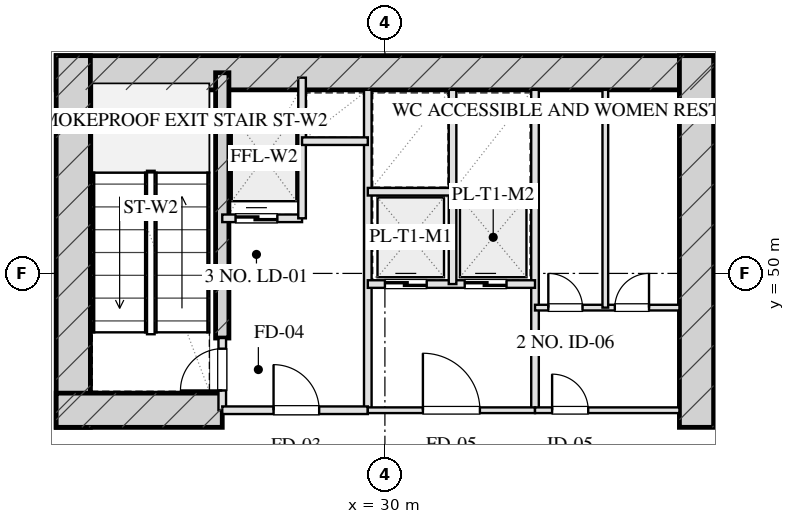
"""IFC4 building model, lengths in metres.
Left out: names, types, materials, properties, quantities, classifications, styles, units other than length and angle.
Written with IfcOpenShell. Run it as: python <this file> out.ifc"""

import sys

from ifc_helpers import new_model, si_unit, direction, frame, frame_2d, origin, place, context, subcontext, project, spatial, rectangle, extrude, element, fill, save


model = new_model("IFC4")
c1 = context("Model", 3, precision=1e-05, world=origin(), true_north=direction((0.0, 1.0)))
c2 = subcontext(c1, "Body", "Model", "MODEL_VIEW")
j1 = project(units=[si_unit("LENGTHUNIT", "METRE"), si_unit("PLANEANGLEUNIT", "RADIAN")], contexts=[c1])
p1 = place(None, origin())
s1 = spatial("IfcSite", under=j1, at=p1, CompositionType="ELEMENT")
p2 = place(p1, origin())
s2 = spatial("IfcBuilding", under=s1, at=p2, CompositionType="ELEMENT")
p3 = place(p2, frame((0.0, 0.0, 11.5)))
s3 = spatial("IfcBuildingStorey", under=s2, at=p3, CompositionType="ELEMENT", Elevation=11.5)
p4 = place(p3, frame((21.35, 55.28, 0.0), z_axis=(0.0, 0.0, 1.0), x_axis=(1.0, 0.0, 0.0)))
e1 = element("IfcWall", 1, at=p4, inside=s3, PredefinedType="SHEAR", context=c2, shape_type="SweptSolid", body=[
    extrude(rectangle(XDim=17.3, YDim=0.9, at=frame_2d((8.65, 0.0))), origin(), (0.0, 0.0, 1.0), 5.0),
])
for number, where, z_axis, x_axis in (
    (2, (21.8, 45.95, 0.0), (0.0, 0.0, 1.0), (0.0, 1.0, 0.0)),
    (3, (38.2, 45.95, 0.0), (0.0, 0.0, 1.0), (0.0, 1.0, 0.0)),
):
    element("IfcWall", number, at=place(p3, frame(where, z_axis=z_axis, x_axis=x_axis)), inside=s3, PredefinedType="SHEAR", context=c2, shape_type="SweptSolid", body=[
        extrude(rectangle(XDim=9.78, YDim=0.9, at=frame_2d((4.89, 0.0))), origin(), (0.0, 0.0, 1.0), 5.0),
    ])
p5 = place(p3, frame((25.72, 48.3, 0.0), z_axis=(0.0, 0.0, 1.0), x_axis=(0.0, 1.0, 0.0)))
e4 = element("IfcWall", 4, at=p5, inside=s3, PredefinedType="SHEAR", context=c2, shape_type="SweptSolid", body=[
    extrude(rectangle(XDim=6.98, YDim=0.35, at=frame_2d((3.49, 0.0))), origin(), (0.0, 0.0, 1.0), 5.0),
])
p6 = place(p3, frame((21.35, 46.4, 0.0), z_axis=(0.0, 0.0, 1.0), x_axis=(1.0, 0.0, 0.0)))
e5 = element("IfcWall", 5, at=p6, inside=s3, PredefinedType="SHEAR", context=c2, shape_type="SweptSolid", body=[
    extrude(rectangle(XDim=4.37, YDim=0.9, at=frame_2d((2.185, 0.0))), origin(), (0.0, 0.0, 1.0), 5.0),
])
p7 = place(p3, frame((25.72, 46.4, 0.0), z_axis=(0.0, 0.0, 1.0), x_axis=(0.0, 1.0, 0.0)))
e6 = element("IfcWall", 6, at=p7, inside=s3, PredefinedType="PARTITIONING", context=c2, shape_type="SweptSolid", body=[
    extrude(rectangle(XDim=1.9, YDim=0.2, at=frame_2d((0.95, 0.0))), origin(), (0.0, 0.0, 1.0), 4.685),
])
p8 = place(p7, frame((0.52, 0.0, 0.0)))
e7 = element("IfcOpeningElement", 7, at=p8, cuts=e6, PredefinedType="OPENING", context=c2, shape_type="SweptSolid", body=[
    extrude(rectangle(XDim=1.1, YDim=2.05, at=frame_2d((0.55, 1.025))), frame((0.0, 0.11, 0.0), z_axis=(0.0, -1.0, 0.0), x_axis=(1.0, 0.0, 0.0)), (0.0, 0.0, 1.0), 0.22),
])
p9 = place(p3, frame((29.55, 46.4, 0.0), z_axis=(0.0, 0.0, 1.0), x_axis=(0.0, 1.0, 0.0)))
e8 = element("IfcWall", 8, at=p9, inside=s3, PredefinedType="PARTITIONING", context=c2, shape_type="SweptSolid", body=[
    extrude(rectangle(XDim=8.43, YDim=0.2, at=frame_2d((4.215, 0.0))), origin(), (0.0, 0.0, 1.0), 4.685),
])
p10 = place(p3, frame((25.72, 46.4, 0.0), z_axis=(0.0, 0.0, 1.0), x_axis=(1.0, 0.0, 0.0)))
e9 = element("IfcWall", 9, at=p10, inside=s3, PredefinedType="PARTITIONING", context=c2, shape_type="SweptSolid", body=[
    extrude(rectangle(XDim=3.83, YDim=0.2, at=frame_2d((1.915, 0.0))), origin(), (0.0, 0.0, 1.0), 4.685),
])
p11 = place(p10, frame((1.35, 0.0, 0.0)))
e10 = element("IfcOpeningElement", 10, at=p11, cuts=e9, PredefinedType="OPENING", context=c2, shape_type="SweptSolid", body=[
    extrude(rectangle(XDim=1.2, YDim=2.05, at=frame_2d((0.6, 1.025))), frame((0.0, 0.11, 0.0), z_axis=(0.0, -1.0, 0.0), x_axis=(1.0, 0.0, 0.0)), (0.0, 0.0, 1.0), 0.22),
])
p12 = place(p3, frame((25.72, 51.45, 0.0), z_axis=(0.0, 0.0, 1.0), x_axis=(1.0, 0.0, 0.0)))
e11 = element("IfcWall", 11, at=p12, inside=s3, PredefinedType="PARTITIONING", context=c2, shape_type="SweptSolid", body=[
    extrude(rectangle(XDim=2.1, YDim=0.2, at=frame_2d((1.05, 0.0))), origin(), (0.0, 0.0, 1.0), 4.685),
])
p13 = place(p12, frame((0.35, 0.0, 0.0)))
e12 = element("IfcOpeningElement", 12, at=p13, cuts=e11, PredefinedType="OPENING", context=c2, shape_type="SweptSolid", body=[
    extrude(rectangle(XDim=1.1, YDim=2.05, at=frame_2d((0.55, 1.025))), frame((0.0, 0.11, 0.0), z_axis=(0.0, -1.0, 0.0), x_axis=(1.0, 0.0, 0.0)), (0.0, 0.0, 1.0), 0.22),
])
p14 = place(p3, frame((27.82, 51.45, 0.0), z_axis=(0.0, 0.0, 1.0), x_axis=(0.0, 1.0, 0.0)))
e13 = element("IfcWall", 13, at=p14, inside=s3, PredefinedType="PARTITIONING", context=c2, shape_type="SweptSolid", body=[
    extrude(rectangle(XDim=3.7, YDim=0.2, at=frame_2d((1.85, 0.0))), origin(), (0.0, 0.0, 1.0), 4.685),
])
p15 = place(p3, frame((27.82, 53.48, 0.0), z_axis=(0.0, 0.0, 1.0), x_axis=(1.0, 0.0, 0.0)))
e14 = element("IfcWall", 14, at=p15, inside=s3, PredefinedType="PARTITIONING", context=c2, shape_type="SweptSolid", body=[
    extrude(rectangle(XDim=1.73, YDim=0.2, at=frame_2d((0.865, 0.0))), origin(), (0.0, 0.0, 1.0), 4.685),
])
p16 = place(p3, frame((33.95, 46.4, 0.0), z_axis=(0.0, 0.0, 1.0), x_axis=(0.0, 1.0, 0.0)))
e15 = element("IfcWall", 15, at=p16, inside=s3, PredefinedType="PARTITIONING", context=c2, shape_type="SweptSolid", body=[
    extrude(rectangle(XDim=8.43, YDim=0.2, at=frame_2d((4.215, 0.0))), origin(), (0.0, 0.0, 1.0), 4.685),
])
p17 = place(p3, frame((29.55, 46.4, 0.0), z_axis=(0.0, 0.0, 1.0), x_axis=(1.0, 0.0, 0.0)))
e16 = element("IfcWall", 16, at=p17, inside=s3, PredefinedType="PARTITIONING", context=c2, shape_type="SweptSolid", body=[
    extrude(rectangle(XDim=4.4, YDim=0.15, at=frame_2d((2.2, 0.0))), origin(), (0.0, 0.0, 1.0), 4.685),
])
p18 = place(p17, frame((1.45, 0.0, 0.0)))
e17 = element("IfcOpeningElement", 17, at=p18, cuts=e16, PredefinedType="OPENING", context=c2, shape_type="SweptSolid", body=[
    extrude(rectangle(XDim=1.5, YDim=2.05, at=frame_2d((0.75, 1.025))), frame((0.0, 0.085, 0.0), z_axis=(0.0, -1.0, 0.0), x_axis=(1.0, 0.0, 0.0)), (0.0, 0.0, 1.0), 0.17),
])
p19 = place(p3, frame((29.55, 49.72, 0.0), z_axis=(0.0, 0.0, 1.0), x_axis=(1.0, 0.0, 0.0)))
e18 = element("IfcWall", 18, at=p19, inside=s3, PredefinedType="PARTITIONING", context=c2, shape_type="SweptSolid", body=[
    extrude(rectangle(XDim=4.4, YDim=0.2, at=frame_2d((2.2, 0.0))), origin(), (0.0, 0.0, 1.0), 4.685),
])
p20 = place(p19, frame((0.45, 0.0, 0.0)))
e19 = element("IfcOpeningElement", 19, at=p20, cuts=e18, PredefinedType="OPENING", context=c2, shape_type="SweptSolid", body=[
    extrude(rectangle(XDim=1.1, YDim=2.05, at=frame_2d((0.55, 1.025))), frame((0.0, 0.11, 0.0), z_axis=(0.0, -1.0, 0.0), x_axis=(1.0, 0.0, 0.0)), (0.0, 0.0, 1.0), 0.22),
])
p21 = place(p19, frame((2.55, 0.0, 0.0)))
e20 = element("IfcOpeningElement", 20, at=p21, cuts=e18, PredefinedType="OPENING", context=c2, shape_type="SweptSolid", body=[
    extrude(rectangle(XDim=1.1, YDim=2.05, at=frame_2d((0.55, 1.025))), frame((0.0, 0.11, 0.0), z_axis=(0.0, -1.0, 0.0), x_axis=(1.0, 0.0, 0.0)), (0.0, 0.0, 1.0), 0.22),
])
p22 = place(p3, frame((31.78, 49.72, 0.0), z_axis=(0.0, 0.0, 1.0), x_axis=(0.0, 1.0, 0.0)))
e21 = element("IfcWall", 21, at=p22, inside=s3, PredefinedType="PARTITIONING", context=c2, shape_type="SweptSolid", body=[
    extrude(rectangle(XDim=5.11, YDim=0.2, at=frame_2d((2.555, 0.0))), origin(), (0.0, 0.0, 1.0), 4.685),
])
p23 = place(p3, frame((29.55, 52.15, 0.0), z_axis=(0.0, 0.0, 1.0), x_axis=(1.0, 0.0, 0.0)))
e22 = element("IfcWall", 22, at=p23, inside=s3, PredefinedType="PARTITIONING", context=c2, shape_type="SweptSolid", body=[
    extrude(rectangle(XDim=4.4, YDim=0.2, at=frame_2d((2.2, 0.0))), origin(), (0.0, 0.0, 1.0), 4.685),
])
p24 = place(p3, frame((33.95, 46.4, 0.0), z_axis=(0.0, 0.0, 1.0), x_axis=(1.0, 0.0, 0.0)))
e23 = element("IfcWall", 23, at=p24, inside=s3, PredefinedType="PARTITIONING", context=c2, shape_type="SweptSolid", body=[
    extrude(rectangle(XDim=3.8, YDim=0.15, at=frame_2d((1.9, 0.0))), origin(), (0.0, 0.0, 1.0), 4.685),
])
p25 = place(p24, frame((0.45, 0.0, 0.0)))
e24 = element("IfcOpeningElement", 24, at=p25, cuts=e23, PredefinedType="OPENING", context=c2, shape_type="SweptSolid", body=[
    extrude(rectangle(XDim=0.95, YDim=2.05, at=frame_2d((0.475, 1.025))), frame((0.0, 0.085, 0.0), z_axis=(0.0, -1.0, 0.0), x_axis=(1.0, 0.0, 0.0)), (0.0, 0.0, 1.0), 0.17),
])
p26 = place(p3, frame((33.95, 49.1, 0.0), z_axis=(0.0, 0.0, 1.0), x_axis=(1.0, 0.0, 0.0)))
e25 = element("IfcWall", 25, at=p26, inside=s3, PredefinedType="PARTITIONING", context=c2, shape_type="SweptSolid", body=[
    extrude(rectangle(XDim=3.8, YDim=0.15, at=frame_2d((1.9, 0.0))), origin(), (0.0, 0.0, 1.0), 4.685),
])
p27 = place(p26, frame((0.35, 0.0, 0.0)))
e26 = element("IfcOpeningElement", 26, at=p27, cuts=e25, PredefinedType="OPENING", context=c2, shape_type="SweptSolid", body=[
    extrude(rectangle(XDim=0.9, YDim=2.05, at=frame_2d((0.45, 1.025))), frame((0.0, 0.085, 0.0), z_axis=(0.0, -1.0, 0.0), x_axis=(1.0, 0.0, 0.0)), (0.0, 0.0, 1.0), 0.17),
])
p28 = place(p26, frame((2.1, 0.0, 0.0)))
e27 = element("IfcOpeningElement", 27, at=p28, cuts=e25, PredefinedType="OPENING", context=c2, shape_type="SweptSolid", body=[
    extrude(rectangle(XDim=0.9, YDim=2.05, at=frame_2d((0.45, 1.025))), frame((0.0, 0.085, 0.0), z_axis=(0.0, -1.0, 0.0), x_axis=(1.0, 0.0, 0.0)), (0.0, 0.0, 1.0), 0.17),
])
p29 = place(p3, frame((35.8, 49.1, 0.0), z_axis=(0.0, 0.0, 1.0), x_axis=(0.0, 1.0, 0.0)))
e28 = element("IfcWall", 28, at=p29, inside=s3, PredefinedType="PARTITIONING", context=c2, shape_type="SweptSolid", body=[
    extrude(rectangle(XDim=5.73, YDim=0.15, at=frame_2d((2.865, 0.0))), origin(), (0.0, 0.0, 1.0), 4.685),
])
p30 = place(p8, origin())
e29 = element("IfcDoor", 29, at=p30, inside=s3, OperationType="SINGLE_SWING_LEFT", PredefinedType="DOOR", context=c2, shape_type="SweptSolid", body=[
    extrude(rectangle(XDim=1.1, YDim=2.05, at=frame_2d((0.55, 1.025))), frame((0.0, 0.025, 0.0), z_axis=(0.0, -1.0, 0.0), x_axis=(1.0, 0.0, 0.0)), (0.0, 0.0, 1.0), 0.05),
])
fill(e7, e29)
p31 = place(p11, origin())
e30 = element("IfcDoor", 30, at=p31, inside=s3, OperationType="SINGLE_SWING_LEFT", PredefinedType="DOOR", context=c2, shape_type="SweptSolid", body=[
    extrude(rectangle(XDim=1.2, YDim=2.05, at=frame_2d((0.6, 1.025))), frame((0.0, 0.025, 0.0), z_axis=(0.0, -1.0, 0.0), x_axis=(1.0, 0.0, 0.0)), (0.0, 0.0, 1.0), 0.05),
])
fill(e10, e30)
p32 = place(p13, origin())
e31 = element("IfcDoor", 31, at=p32, inside=s3, OperationType="DOUBLE_DOOR_SLIDING", PredefinedType="DOOR", context=c2, shape_type="SweptSolid", body=[
    extrude(rectangle(XDim=1.1, YDim=2.05, at=frame_2d((0.55, 1.025))), frame((0.0, 0.025, 0.0), z_axis=(0.0, -1.0, 0.0), x_axis=(1.0, 0.0, 0.0)), (0.0, 0.0, 1.0), 0.05),
])
fill(e12, e31)
p33 = place(p18, origin())
e32 = element("IfcDoor", 32, at=p33, inside=s3, OperationType="SINGLE_SWING_LEFT", PredefinedType="DOOR", context=c2, shape_type="SweptSolid", body=[
    extrude(rectangle(XDim=1.5, YDim=2.05, at=frame_2d((0.75, 1.025))), frame((0.0, 0.025, 0.0), z_axis=(0.0, -1.0, 0.0), x_axis=(1.0, 0.0, 0.0)), (0.0, 0.0, 1.0), 0.05),
])
fill(e17, e32)
p34 = place(p20, origin())
e33 = element("IfcDoor", 33, at=p34, inside=s3, OperationType="DOUBLE_DOOR_SLIDING", PredefinedType="DOOR", context=c2, shape_type="SweptSolid", body=[
    extrude(rectangle(XDim=1.1, YDim=2.05, at=frame_2d((0.55, 1.025))), frame((0.0, 0.025, 0.0), z_axis=(0.0, -1.0, 0.0), x_axis=(1.0, 0.0, 0.0)), (0.0, 0.0, 1.0), 0.05),
])
fill(e19, e33)
p35 = place(p21, origin())
e34 = element("IfcDoor", 34, at=p35, inside=s3, OperationType="DOUBLE_DOOR_SLIDING", PredefinedType="DOOR", context=c2, shape_type="SweptSolid", body=[
    extrude(rectangle(XDim=1.1, YDim=2.05, at=frame_2d((0.55, 1.025))), frame((0.0, 0.025, 0.0), z_axis=(0.0, -1.0, 0.0), x_axis=(1.0, 0.0, 0.0)), (0.0, 0.0, 1.0), 0.05),
])
fill(e20, e34)
p36 = place(p25, origin())
e35 = element("IfcDoor", 35, at=p36, inside=s3, OperationType="SINGLE_SWING_LEFT", PredefinedType="DOOR", context=c2, shape_type="SweptSolid", body=[
    extrude(rectangle(XDim=0.95, YDim=2.05, at=frame_2d((0.475, 1.025))), frame((0.0, 0.025, 0.0), z_axis=(0.0, -1.0, 0.0), x_axis=(1.0, 0.0, 0.0)), (0.0, 0.0, 1.0), 0.05),
])
fill(e24, e35)
p37 = place(p27, origin())
e36 = element("IfcDoor", 36, at=p37, inside=s3, OperationType="SINGLE_SWING_LEFT", PredefinedType="DOOR", context=c2, shape_type="SweptSolid", body=[
    extrude(rectangle(XDim=0.9, YDim=2.05, at=frame_2d((0.45, 1.025))), frame((0.0, 0.025, 0.0), z_axis=(0.0, -1.0, 0.0), x_axis=(1.0, 0.0, 0.0)), (0.0, 0.0, 1.0), 0.05),
])
fill(e26, e36)
p38 = place(p28, origin())
e37 = element("IfcDoor", 37, at=p38, inside=s3, OperationType="SINGLE_SWING_RIGHT", PredefinedType="DOOR", context=c2, shape_type="SweptSolid", body=[
    extrude(rectangle(XDim=0.9, YDim=2.05, at=frame_2d((0.45, 1.025))), frame((0.0, 0.025, 0.0), z_axis=(0.0, -1.0, 0.0), x_axis=(1.0, 0.0, 0.0)), (0.0, 0.0, 1.0), 0.05),
])
fill(e27, e37)
save(model, sys.argv[1])
